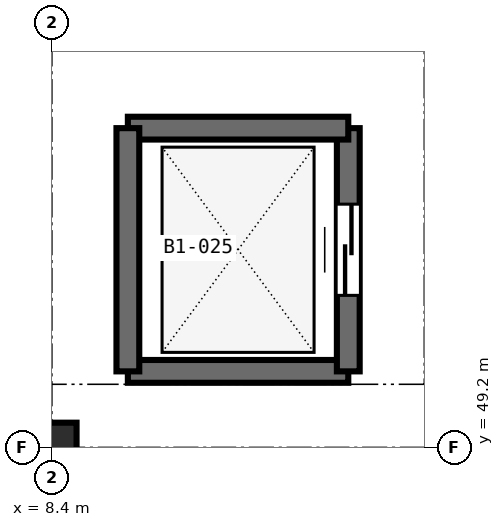
"""IFC4 building model, lengths in metres.
Left out: names, types, materials, properties, quantities, classifications, styles, units other than length and angle.
Written with IfcOpenShell. Run it as: python <this file> out.ifc"""

import sys

from ifc_helpers import new_model, si_unit, direction, frame, frame_2d, origin, origin_2d, place, context, subcontext, project, spatial, rectangle, extrude, element, fill, save


model = new_model("IFC4")
c1 = context("Model", 3, precision=1e-05, world=origin(), true_north=direction((0.0, 1.0)))
c2 = subcontext(c1, "Body", "Model", "MODEL_VIEW")
j1 = project(units=[si_unit("LENGTHUNIT", "METRE"), si_unit("PLANEANGLEUNIT", "RADIAN")], contexts=[c1])
p1 = place(None, origin())
s1 = spatial("IfcSite", under=j1, at=p1, CompositionType="ELEMENT")
p2 = place(p1, origin())
s2 = spatial("IfcBuilding", under=s1, at=p2, CompositionType="ELEMENT")
p3 = place(p2, frame((0.0, 0.0, -4.8)))
s3 = spatial("IfcBuildingStorey", under=s2, at=p3, CompositionType="ELEMENT", Elevation=-4.8)
p4 = place(p3, frame((8.4, 49.2, 0.0), z_axis=(0.0, 0.0, 1.0), x_axis=(1.0, 0.0, 0.0)))
e1 = element("IfcColumn", 1, at=p4, inside=s3, PredefinedType="COLUMN", context=c2, shape_type="SweptSolid", body=[
    extrude(rectangle(XDim=0.65, YDim=0.65, at=origin_2d()), origin(), (0.0, 0.0, 1.0), 4.8),
])
p5 = place(p3, frame((9.4, 50.2, 0.0), z_axis=(0.0, 0.0, 1.0), x_axis=(1.0, 0.0, 0.0)))
e2 = element("IfcWall", 2, at=p5, inside=s3, PredefinedType="SHEAR", context=c2, shape_type="SweptSolid", body=[
    extrude(rectangle(XDim=2.9, YDim=0.3, at=frame_2d((1.45, 0.0))), origin(), (0.0, 0.0, 1.0), 4.8),
])
p6 = place(p3, frame((12.3, 50.2, 0.0), z_axis=(0.0, 0.0, 1.0), x_axis=(0.0, 1.0, 0.0)))
e3 = element("IfcWall", 3, at=p6, inside=s3, PredefinedType="SHEAR", context=c2, shape_type="SweptSolid", body=[
    extrude(rectangle(XDim=3.2, YDim=0.3, at=frame_2d((1.6, 0.0))), origin(), (0.0, 0.0, 1.0), 4.8),
])
p7 = place(p6, frame((1.0, 0.0, 0.0)))
e4 = element("IfcOpeningElement", 4, at=p7, cuts=e3, PredefinedType="OPENING", context=c2, shape_type="SweptSolid", body=[
    extrude(rectangle(XDim=1.2, YDim=2.2, at=frame_2d((0.6, 1.1))), frame((0.0, 0.16, 0.0), z_axis=(0.0, -1.0, 0.0), x_axis=(1.0, 0.0, 0.0)), (0.0, 0.0, 1.0), 0.32),
])
p8 = place(p3, frame((12.3, 53.4, 0.0), z_axis=(0.0, 0.0, 1.0), x_axis=(-1.0, 0.0, 0.0)))
e5 = element("IfcWall", 5, at=p8, inside=s3, PredefinedType="SHEAR", context=c2, shape_type="SweptSolid", body=[
    extrude(rectangle(XDim=2.9, YDim=0.3, at=frame_2d((1.45, 0.0))), origin(), (0.0, 0.0, 1.0), 4.8),
])
p9 = place(p3, frame((9.4, 53.4, 0.0), z_axis=(0.0, 0.0, 1.0), x_axis=(0.0, -1.0, 0.0)))
e6 = element("IfcWall", 6, at=p9, inside=s3, PredefinedType="SHEAR", context=c2, shape_type="SweptSolid", body=[
    extrude(rectangle(XDim=3.2, YDim=0.3, at=frame_2d((1.6, 0.0))), origin(), (0.0, 0.0, 1.0), 4.8),
])
p10 = place(p7, origin())
e7 = element("IfcDoor", 7, at=p10, inside=s3, OperationType="DOUBLE_DOOR_SLIDING", PredefinedType="DOOR", context=c2, shape_type="SweptSolid", body=[
    extrude(rectangle(XDim=1.2, YDim=2.2, at=frame_2d((0.6, 1.1))), frame((0.0, 0.025, 0.0), z_axis=(0.0, -1.0, 0.0), x_axis=(1.0, 0.0, 0.0)), (0.0, 0.0, 1.0), 0.05),
])
fill(e4, e7)
save(model, sys.argv[1])
